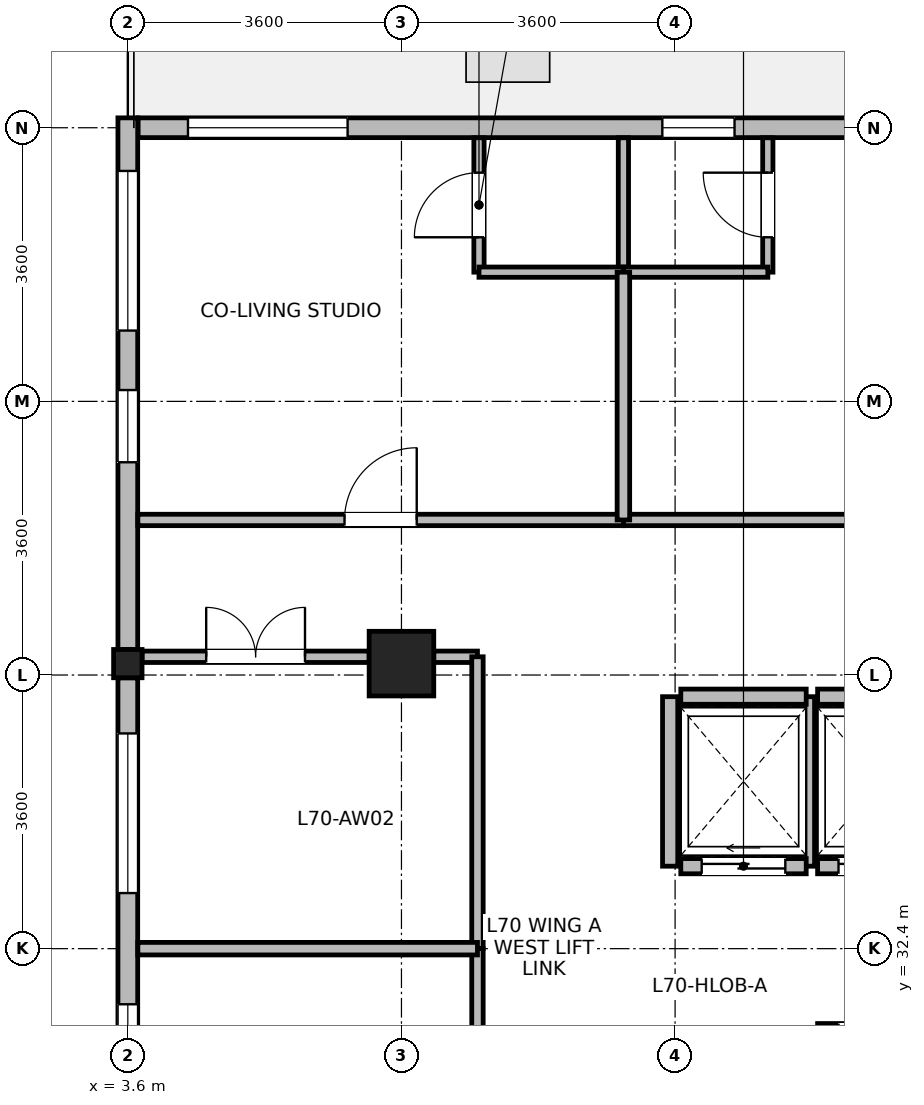
"""IFC4 building model, lengths in metres.
Left out: names, types, materials, properties, quantities, classifications, styles, units other than length and angle.
Written with IfcOpenShell. Run it as: python <this file> out.ifc"""

import sys

from ifc_helpers import new_model, si_unit, direction, frame, frame_2d, origin, origin_2d, place, context, subcontext, project, spatial, rectangle, i_section, extrude, source, transform, mapped, element, fill, save


model = new_model("IFC4")
c1 = context("Model", 3, precision=1e-05, world=origin(), true_north=direction((0.0, 1.0)))
c2 = subcontext(c1, "Body", "Model", "MODEL_VIEW")
j1 = project(units=[si_unit("LENGTHUNIT", "METRE"), si_unit("PLANEANGLEUNIT", "RADIAN")], contexts=[c1])
p1 = place(None, origin())
s1 = spatial("IfcSite", under=j1, at=p1, CompositionType="ELEMENT")
p2 = place(p1, origin())
s2 = spatial("IfcBuilding", under=s1, at=p2, CompositionType="ELEMENT")
p3 = place(p2, frame((0.0, 0.0, 272.1)))
s3 = spatial("IfcBuildingStorey", under=s2, at=p3, CompositionType="ELEMENT", Elevation=272.1)
m1 = source(origin(), c2, "Body", "SweptSolid", [
    extrude(rectangle(XDim=0.85, YDim=0.85, at=origin_2d()), origin(), (0.0, 0.0, 1.0), 3.7),
])
p4 = place(p3, frame((7.2, 36.15, 0.0), z_axis=(0.0, 0.0, 1.0), x_axis=(1.0, 0.0, 0.0)))
e1 = element("IfcColumn", 1, at=p4, inside=s3, PredefinedType="COLUMN", context=c2, shape_type="MappedRepresentation", body=[
    mapped(m1, transform((0.0, 0.0, 0.0), x_axis=(1.0, 0.0, 0.0), y_axis=(0.0, 1.0, 0.0), z_axis=(0.0, 0.0, 1.0), scale=1.0)),
])
m2 = source(origin(), c2, "Body", "SweptSolid", [
    extrude(i_section(OverallWidth=0.374, OverallDepth=0.372, WebThickness=0.015, FlangeThickness=0.026, FilletRadius=0.015, at=origin_2d()), origin(), (0.0, 0.0, 1.0), 3.7),
])
p5 = place(p3, frame((3.6, 36.15, 0.0), z_axis=(0.0, 0.0, 1.0), x_axis=(1.0, 0.0, 0.0)))
e2 = element("IfcColumn", 2, at=p5, inside=s3, PredefinedType="COLUMN", context=c2, shape_type="MappedRepresentation", body=[
    mapped(m2, transform((0.0, 0.0, 0.0), x_axis=(1.0, 0.0, 0.0), y_axis=(0.0, 1.0, 0.0), z_axis=(0.0, 0.0, 1.0), scale=1.0)),
])
p6 = place(p3, frame((3.735, 43.2, 0.0), z_axis=(0.0, 0.0, 1.0), x_axis=(1.0, 0.0, 0.0)))
e3 = element("IfcWall", 3, at=p6, inside=s3, PredefinedType="STANDARD", context=c2, shape_type="SweptSolid", body=[
    extrude(rectangle(XDim=10.239, YDim=0.26, at=frame_2d((5.12, 0.0))), origin(), (0.0, 0.0, 1.0), 3.455),
])
p7 = place(p6, frame((0.656, 0.0, 0.85)))
e4 = element("IfcOpeningElement", 4, at=p7, cuts=e3, PredefinedType="OPENING", context=c2, shape_type="SweptSolid", body=[
    extrude(rectangle(XDim=2.1, YDim=1.95, at=frame_2d((1.05, 0.975))), frame((0.0, 0.14, 0.0), z_axis=(0.0, -1.0, 0.0), x_axis=(1.0, 0.0, 0.0)), (0.0, 0.0, 1.0), 0.28),
])
p8 = place(p6, frame((6.897, 0.0, 0.85)))
e5 = element("IfcOpeningElement", 5, at=p8, cuts=e3, PredefinedType="OPENING", context=c2, shape_type="SweptSolid", body=[
    extrude(rectangle(XDim=0.95, YDim=1.75, at=frame_2d((0.475, 0.875))), frame((0.0, 0.14, 0.0), z_axis=(0.0, -1.0, 0.0), x_axis=(1.0, 0.0, 0.0)), (0.0, 0.0, 1.0), 0.28),
])
p9 = place(p3, frame((3.6, 36.337, 0.0), z_axis=(0.0, 0.0, 1.0), x_axis=(0.0, 1.0, 0.0)))
e6 = element("IfcWall", 6, at=p9, inside=s3, PredefinedType="STANDARD", context=c2, shape_type="SweptSolid", body=[
    extrude(rectangle(XDim=6.993, YDim=0.26, at=frame_2d((3.497, 0.0))), origin(), (0.0, 0.0, 1.0), 3.455),
])
p10 = place(p9, frame((4.195, 0.0, 0.85)))
e7 = element("IfcOpeningElement", 7, at=p10, cuts=e6, PredefinedType="OPENING", context=c2, shape_type="SweptSolid", body=[
    extrude(rectangle(XDim=2.1, YDim=1.95, at=frame_2d((1.05, 0.975))), frame((0.0, 0.14, 0.0), z_axis=(0.0, -1.0, 0.0), x_axis=(1.0, 0.0, 0.0)), (0.0, 0.0, 1.0), 0.28),
])
p11 = place(p9, frame((2.462, 0.0, 0.85)))
e8 = element("IfcOpeningElement", 8, at=p11, cuts=e6, PredefinedType="OPENING", context=c2, shape_type="SweptSolid", body=[
    extrude(rectangle(XDim=0.95, YDim=1.75, at=frame_2d((0.475, 0.875))), frame((0.0, 0.14, 0.0), z_axis=(0.0, -1.0, 0.0), x_axis=(1.0, 0.0, 0.0)), (0.0, 0.0, 1.0), 0.28),
])
p12 = place(p3, frame((3.6, 28.837, 0.0), z_axis=(0.0, 0.0, 1.0), x_axis=(0.0, 1.0, 0.0)))
e9 = element("IfcWall", 9, at=p12, inside=s3, PredefinedType="STANDARD", context=c2, shape_type="SweptSolid", body=[
    extrude(rectangle(XDim=7.126, YDim=0.26, at=frame_2d((3.563, 0.0))), origin(), (0.0, 0.0, 1.0), 3.055),
])
p13 = place(p12, frame((0.731, 0.0, 0.85)))
e10 = element("IfcOpeningElement", 10, at=p13, cuts=e9, PredefinedType="OPENING", context=c2, shape_type="SweptSolid", body=[
    extrude(rectangle(XDim=2.1, YDim=1.95, at=frame_2d((1.05, 0.975))), frame((0.0, 0.14, 0.0), z_axis=(0.0, -1.0, 0.0), x_axis=(1.0, 0.0, 0.0)), (0.0, 0.0, 1.0), 0.28),
])
p14 = place(p12, frame((4.294, 0.0, 0.85)))
e11 = element("IfcOpeningElement", 11, at=p14, cuts=e9, PredefinedType="OPENING", context=c2, shape_type="SweptSolid", body=[
    extrude(rectangle(XDim=2.1, YDim=1.95, at=frame_2d((1.05, 0.975))), frame((0.0, 0.14, 0.0), z_axis=(0.0, -1.0, 0.0), x_axis=(1.0, 0.0, 0.0)), (0.0, 0.0, 1.0), 0.28),
])
p15 = place(p3, frame((12.675, 33.485, 0.0), z_axis=(0.0, 0.0, 1.0), x_axis=(1.0, 0.0, 0.0)))
e12 = element("IfcWall", 12, at=p15, inside=s3, PredefinedType="PARTITIONING", context=c2, shape_type="SweptSolid", body=[
    extrude(rectangle(XDim=1.65, YDim=0.2, at=frame_2d((0.825, 0.0))), origin(), (0.0, 0.0, 1.0), 3.455),
])
p16 = place(p15, frame((0.275, 0.0, 0.0)))
e13 = element("IfcOpeningElement", 13, at=p16, cuts=e12, PredefinedType="OPENING", context=c2, shape_type="SweptSolid", body=[
    extrude(rectangle(XDim=1.1, YDim=2.12, at=frame_2d((0.55, 1.06))), frame((0.0, 0.11, 0.0), z_axis=(0.0, -1.0, 0.0), x_axis=(1.0, 0.0, 0.0)), (0.0, 0.0, 1.0), 0.22),
])
p17 = place(p3, frame((12.675, 35.715, 0.0), z_axis=(0.0, 0.0, 1.0), x_axis=(1.0, 0.0, 0.0)))
e14 = element("IfcWall", 14, at=p17, inside=s3, PredefinedType="PARTITIONING", context=c2, shape_type="SweptSolid", body=[
    extrude(rectangle(XDim=1.65, YDim=0.2, at=frame_2d((0.825, 0.0))), origin(), (0.0, 0.0, 1.0), 3.455),
])
p18 = place(p3, frame((12.535, 33.485, 0.0), z_axis=(0.0, 0.0, 1.0), x_axis=(0.0, 1.0, 0.0)))
e15 = element("IfcWall", 15, at=p18, inside=s3, PredefinedType="PARTITIONING", context=c2, shape_type="SweptSolid", body=[
    extrude(rectangle(XDim=2.23, YDim=0.2, at=frame_2d((1.115, 0.0))), origin(), (0.0, 0.0, 1.0), 3.455),
])
p19 = place(p3, frame((12.675, 31.315, 0.0), z_axis=(0.0, 0.0, 1.0), x_axis=(1.0, 0.0, 0.0)))
e16 = element("IfcWall", 16, at=p19, inside=s3, PredefinedType="PARTITIONING", context=c2, shape_type="SweptSolid", body=[
    extrude(rectangle(XDim=1.65, YDim=0.2, at=frame_2d((0.825, 0.0))), origin(), (0.0, 0.0, 1.0), 3.455),
])
p20 = place(p19, frame((0.275, 0.0, 0.0)))
e17 = element("IfcOpeningElement", 17, at=p20, cuts=e16, PredefinedType="OPENING", context=c2, shape_type="SweptSolid", body=[
    extrude(rectangle(XDim=1.1, YDim=2.12, at=frame_2d((0.55, 1.06))), frame((0.0, 0.11, 0.0), z_axis=(0.0, -1.0, 0.0), x_axis=(1.0, 0.0, 0.0)), (0.0, 0.0, 1.0), 0.22),
])
p21 = place(p3, frame((10.875, 33.485, 0.0), z_axis=(0.0, 0.0, 1.0), x_axis=(1.0, 0.0, 0.0)))
e18 = element("IfcWall", 18, at=p21, inside=s3, PredefinedType="PARTITIONING", context=c2, shape_type="SweptSolid", body=[
    extrude(rectangle(XDim=1.65, YDim=0.2, at=frame_2d((0.825, 0.0))), origin(), (0.0, 0.0, 1.0), 3.455),
])
p22 = place(p21, frame((0.275, 0.0, 0.0)))
e19 = element("IfcOpeningElement", 19, at=p22, cuts=e18, PredefinedType="OPENING", context=c2, shape_type="SweptSolid", body=[
    extrude(rectangle(XDim=1.1, YDim=2.12, at=frame_2d((0.55, 1.06))), frame((0.0, 0.11, 0.0), z_axis=(0.0, -1.0, 0.0), x_axis=(1.0, 0.0, 0.0)), (0.0, 0.0, 1.0), 0.22),
])
p23 = place(p3, frame((10.875, 35.715, 0.0), z_axis=(0.0, 0.0, 1.0), x_axis=(1.0, 0.0, 0.0)))
e20 = element("IfcWall", 20, at=p23, inside=s3, PredefinedType="PARTITIONING", context=c2, shape_type="SweptSolid", body=[
    extrude(rectangle(XDim=1.65, YDim=0.2, at=frame_2d((0.825, 0.0))), origin(), (0.0, 0.0, 1.0), 3.455),
])
p24 = place(p3, frame((10.735, 33.485, 0.0), z_axis=(0.0, 0.0, 1.0), x_axis=(0.0, 1.0, 0.0)))
e21 = element("IfcWall", 21, at=p24, inside=s3, PredefinedType="PARTITIONING", context=c2, shape_type="SweptSolid", body=[
    extrude(rectangle(XDim=2.23, YDim=0.2, at=frame_2d((1.115, 0.0))), origin(), (0.0, 0.0, 1.0), 3.455),
])
p25 = place(p3, frame((8.22, 41.3, 0.0), z_axis=(0.0, 0.0, 1.0), x_axis=(0.0, 1.0, 0.0)))
e22 = element("IfcWall", 22, at=p25, inside=s3, PredefinedType="PARTITIONING", context=c2, shape_type="SweptSolid", body=[
    extrude(rectangle(XDim=1.768, YDim=0.135, at=frame_2d((0.884, 0.0))), origin(), (0.0, 0.0, 1.0), 3.455),
])
p26 = place(p25, frame((0.459, 0.0, 0.0)))
e23 = element("IfcOpeningElement", 23, at=p26, cuts=e22, PredefinedType="OPENING", context=c2, shape_type="SweptSolid", body=[
    extrude(rectangle(XDim=0.85, YDim=2.04, at=frame_2d((0.425, 1.02))), frame((0.0, 0.078, 0.0), z_axis=(0.0, -1.0, 0.0), x_axis=(1.0, 0.0, 0.0)), (0.0, 0.0, 1.0), 0.155),
])
p27 = place(p3, frame((10.12, 41.3, 0.0), z_axis=(0.0, 0.0, 1.0), x_axis=(0.0, 1.0, 0.0)))
e24 = element("IfcWall", 24, at=p27, inside=s3, PredefinedType="PARTITIONING", context=c2, shape_type="SweptSolid", body=[
    extrude(rectangle(XDim=1.768, YDim=0.135, at=frame_2d((0.884, 0.0))), origin(), (0.0, 0.0, 1.0), 3.455),
])
p28 = place(p3, frame((12.02, 41.3, 0.0), z_axis=(0.0, 0.0, 1.0), x_axis=(0.0, 1.0, 0.0)))
e25 = element("IfcWall", 25, at=p28, inside=s3, PredefinedType="PARTITIONING", context=c2, shape_type="SweptSolid", body=[
    extrude(rectangle(XDim=1.768, YDim=0.135, at=frame_2d((0.884, 0.0))), origin(), (0.0, 0.0, 1.0), 3.455),
])
p29 = place(p28, frame((0.459, 0.0, 0.0)))
e26 = element("IfcOpeningElement", 26, at=p29, cuts=e25, PredefinedType="OPENING", context=c2, shape_type="SweptSolid", body=[
    extrude(rectangle(XDim=0.85, YDim=2.04, at=frame_2d((0.425, 1.02))), frame((0.0, 0.078, 0.0), z_axis=(0.0, -1.0, 0.0), x_axis=(1.0, 0.0, 0.0)), (0.0, 0.0, 1.0), 0.155),
])
p30 = place(p3, frame((10.12, 41.3, 0.0), z_axis=(0.0, 0.0, 1.0), x_axis=(1.0, 0.0, 0.0)))
e27 = element("IfcWall", 27, at=p30, inside=s3, PredefinedType="PARTITIONING", context=c2, shape_type="SweptSolid", body=[
    extrude(rectangle(XDim=1.9, YDim=0.135, at=frame_2d((0.95, 0.0))), origin(), (0.0, 0.0, 1.0), 3.455),
])
p31 = place(p3, frame((8.22, 41.3, 0.0), z_axis=(0.0, 0.0, 1.0), x_axis=(1.0, 0.0, 0.0)))
e28 = element("IfcWall", 28, at=p31, inside=s3, PredefinedType="PARTITIONING", context=c2, shape_type="SweptSolid", body=[
    extrude(rectangle(XDim=1.9, YDim=0.135, at=frame_2d((0.95, 0.0))), origin(), (0.0, 0.0, 1.0), 3.455),
])
p32 = place(p3, frame((10.12, 38.04, 0.0), z_axis=(0.0, 0.0, 1.0), x_axis=(1.0, 0.0, 0.0)))
e29 = element("IfcWall", 29, at=p32, inside=s3, PredefinedType="PARTITIONING", context=c2, shape_type="SweptSolid", body=[
    extrude(rectangle(XDim=7.7, YDim=0.15, at=frame_2d((3.85, 0.0))), origin(), (0.0, 0.0, 1.0), 3.455),
])
p33 = place(p32, frame((3.325, 0.0, 0.0)))
e30 = element("IfcOpeningElement", 30, at=p33, cuts=e29, PredefinedType="OPENING", context=c2, shape_type="SweptSolid", body=[
    extrude(rectangle(XDim=1.05, YDim=2.12, at=frame_2d((0.525, 1.06))), frame((0.0, 0.085, 0.0), z_axis=(0.0, -1.0, 0.0), x_axis=(1.0, 0.0, 0.0)), (0.0, 0.0, 1.0), 0.17),
])
p34 = place(p3, frame((3.732, 38.04, 0.0), z_axis=(0.0, 0.0, 1.0), x_axis=(1.0, 0.0, 0.0)))
e31 = element("IfcWall", 31, at=p34, inside=s3, PredefinedType="PARTITIONING", context=c2, shape_type="SweptSolid", body=[
    extrude(rectangle(XDim=6.388, YDim=0.15, at=frame_2d((3.194, 0.0))), origin(), (0.0, 0.0, 1.0), 3.455),
])
p35 = place(p34, frame((2.719, 0.0, 0.0)))
e32 = element("IfcOpeningElement", 32, at=p35, cuts=e31, PredefinedType="OPENING", context=c2, shape_type="SweptSolid", body=[
    extrude(rectangle(XDim=0.95, YDim=2.1, at=frame_2d((0.475, 1.05))), frame((0.0, 0.085, 0.0), z_axis=(0.0, -1.0, 0.0), x_axis=(1.0, 0.0, 0.0)), (0.0, 0.0, 1.0), 0.17),
])
p36 = place(p3, frame((3.787, 36.24, 0.0), z_axis=(0.0, 0.0, 1.0), x_axis=(1.0, 0.0, 0.0)))
e33 = element("IfcWall", 33, at=p36, inside=s3, PredefinedType="PARTITIONING", context=c2, shape_type="SweptSolid", body=[
    extrude(rectangle(XDim=2.988, YDim=0.15, at=frame_2d((1.494, 0.0))), origin(), (0.0, 0.0, 1.0), 2.905),
])
p37 = place(p36, frame((0.844, 0.0, 0.0)))
e34 = element("IfcOpeningElement", 34, at=p37, cuts=e33, PredefinedType="OPENING", context=c2, shape_type="SweptSolid", body=[
    extrude(rectangle(XDim=1.3, YDim=2.12, at=frame_2d((0.65, 1.06))), frame((0.0, 0.085, 0.0), z_axis=(0.0, -1.0, 0.0), x_axis=(1.0, 0.0, 0.0)), (0.0, 0.0, 1.0), 0.17),
])
p38 = place(p3, frame((7.625, 36.24, 0.0), z_axis=(0.0, 0.0, 1.0), x_axis=(1.0, 0.0, 0.0)))
e35 = element("IfcWall", 35, at=p38, inside=s3, PredefinedType="PARTITIONING", context=c2, shape_type="SweptSolid", body=[
    extrude(rectangle(XDim=0.575, YDim=0.15, at=frame_2d((0.288, 0.0))), origin(), (0.0, 0.0, 1.0), 2.905),
])
p39 = place(p3, frame((8.2, 32.4, 0.0), z_axis=(0.0, 0.0, 1.0), x_axis=(0.0, 1.0, 0.0)))
e36 = element("IfcWall", 36, at=p39, inside=s3, PredefinedType="PARTITIONING", context=c2, shape_type="SweptSolid", body=[
    extrude(rectangle(XDim=3.84, YDim=0.15, at=frame_2d((1.92, 0.0))), origin(), (0.0, 0.0, 1.0), 3.455),
])
p40 = place(p3, frame((8.2, 28.56, 0.0), z_axis=(0.0, 0.0, 1.0), x_axis=(0.0, 1.0, 0.0)))
e37 = element("IfcWall", 37, at=p40, inside=s3, PredefinedType="PARTITIONING", context=c2, shape_type="SweptSolid", body=[
    extrude(rectangle(XDim=3.84, YDim=0.15, at=frame_2d((1.92, 0.0))), origin(), (0.0, 0.0, 1.0), 3.455),
])
p41 = place(p3, frame((3.732, 32.4, 0.0), z_axis=(0.0, 0.0, 1.0), x_axis=(1.0, 0.0, 0.0)))
e38 = element("IfcWall", 38, at=p41, inside=s3, PredefinedType="PARTITIONING", context=c2, shape_type="SweptSolid", body=[
    extrude(rectangle(XDim=4.468, YDim=0.165, at=frame_2d((2.234, 0.0))), origin(), (0.0, 0.0, 1.0), 3.455),
])
p42 = place(p3, frame((10.12, 38.04, 0.0), z_axis=(0.0, 0.0, 1.0), x_axis=(0.0, 1.0, 0.0)))
e39 = element("IfcWall", 39, at=p42, inside=s3, PredefinedType="PARTITIONING", context=c2, shape_type="SweptSolid", body=[
    extrude(rectangle(XDim=3.26, YDim=0.165, at=frame_2d((1.63, 0.0))), origin(), (0.0, 0.0, 1.0), 3.455),
])
p43 = place(p7, origin())
e40 = element("IfcWindow", 40, at=p43, inside=s3, PartitioningType="SINGLE_PANEL", PredefinedType="WINDOW", context=c2, shape_type="SweptSolid", body=[
    extrude(rectangle(XDim=2.1, YDim=1.95, at=frame_2d((1.05, 0.975))), frame((0.0, 0.03, 0.0), z_axis=(0.0, -1.0, 0.0), x_axis=(1.0, 0.0, 0.0)), (0.0, 0.0, 1.0), 0.06),
])
fill(e4, e40)
p44 = place(p8, origin())
e41 = element("IfcWindow", 41, at=p44, inside=s3, PartitioningType="SINGLE_PANEL", PredefinedType="WINDOW", context=c2, shape_type="SweptSolid", body=[
    extrude(rectangle(XDim=0.95, YDim=1.75, at=frame_2d((0.475, 0.875))), frame((0.0, 0.03, 0.0), z_axis=(0.0, -1.0, 0.0), x_axis=(1.0, 0.0, 0.0)), (0.0, 0.0, 1.0), 0.06),
])
fill(e5, e41)
p45 = place(p10, origin())
e42 = element("IfcWindow", 42, at=p45, inside=s3, PartitioningType="SINGLE_PANEL", PredefinedType="WINDOW", context=c2, shape_type="SweptSolid", body=[
    extrude(rectangle(XDim=2.1, YDim=1.95, at=frame_2d((1.05, 0.975))), frame((0.0, 0.03, 0.0), z_axis=(0.0, -1.0, 0.0), x_axis=(1.0, 0.0, 0.0)), (0.0, 0.0, 1.0), 0.06),
])
fill(e7, e42)
p46 = place(p11, origin())
e43 = element("IfcWindow", 43, at=p46, inside=s3, PartitioningType="SINGLE_PANEL", PredefinedType="WINDOW", context=c2, shape_type="SweptSolid", body=[
    extrude(rectangle(XDim=0.95, YDim=1.75, at=frame_2d((0.475, 0.875))), frame((0.0, 0.03, 0.0), z_axis=(0.0, -1.0, 0.0), x_axis=(1.0, 0.0, 0.0)), (0.0, 0.0, 1.0), 0.06),
])
fill(e8, e43)
p47 = place(p13, origin())
e44 = element("IfcWindow", 44, at=p47, inside=s3, PartitioningType="SINGLE_PANEL", PredefinedType="WINDOW", context=c2, shape_type="SweptSolid", body=[
    extrude(rectangle(XDim=2.1, YDim=1.95, at=frame_2d((1.05, 0.975))), frame((0.0, 0.03, 0.0), z_axis=(0.0, -1.0, 0.0), x_axis=(1.0, 0.0, 0.0)), (0.0, 0.0, 1.0), 0.06),
])
fill(e10, e44)
p48 = place(p14, origin())
e45 = element("IfcWindow", 45, at=p48, inside=s3, PartitioningType="SINGLE_PANEL", PredefinedType="WINDOW", context=c2, shape_type="SweptSolid", body=[
    extrude(rectangle(XDim=2.1, YDim=1.95, at=frame_2d((1.05, 0.975))), frame((0.0, 0.03, 0.0), z_axis=(0.0, -1.0, 0.0), x_axis=(1.0, 0.0, 0.0)), (0.0, 0.0, 1.0), 0.06),
])
fill(e11, e45)
p49 = place(p16, origin())
e46 = element("IfcDoor", 46, at=p49, inside=s3, OperationType="SLIDING_TO_LEFT", PredefinedType="DOOR", context=c2, shape_type="SweptSolid", body=[
    extrude(rectangle(XDim=1.1, YDim=2.12, at=frame_2d((0.55, 1.06))), frame((0.0, 0.025, 0.0), z_axis=(0.0, -1.0, 0.0), x_axis=(1.0, 0.0, 0.0)), (0.0, 0.0, 1.0), 0.05),
])
fill(e13, e46)
p50 = place(p22, origin())
e47 = element("IfcDoor", 47, at=p50, inside=s3, OperationType="SLIDING_TO_LEFT", PredefinedType="DOOR", context=c2, shape_type="SweptSolid", body=[
    extrude(rectangle(XDim=1.1, YDim=2.12, at=frame_2d((0.55, 1.06))), frame((0.0, 0.025, 0.0), z_axis=(0.0, -1.0, 0.0), x_axis=(1.0, 0.0, 0.0)), (0.0, 0.0, 1.0), 0.05),
])
fill(e19, e47)
p51 = place(p26, origin())
e48 = element("IfcDoor", 48, at=p51, inside=s3, OperationType="SINGLE_SWING_LEFT", PredefinedType="DOOR", context=c2, shape_type="SweptSolid", body=[
    extrude(rectangle(XDim=0.85, YDim=2.04, at=frame_2d((0.425, 1.02))), frame((0.0, 0.025, 0.0), z_axis=(0.0, -1.0, 0.0), x_axis=(1.0, 0.0, 0.0)), (0.0, 0.0, 1.0), 0.05),
])
fill(e23, e48)
p52 = place(p29, origin())
e49 = element("IfcDoor", 49, at=p52, inside=s3, OperationType="SINGLE_SWING_RIGHT", PredefinedType="DOOR", context=c2, shape_type="SweptSolid", body=[
    extrude(rectangle(XDim=0.85, YDim=2.04, at=frame_2d((0.425, 1.02))), frame((0.0, 0.025, 0.0), z_axis=(0.0, -1.0, 0.0), x_axis=(1.0, 0.0, 0.0)), (0.0, 0.0, 1.0), 0.05),
])
fill(e26, e49)
p53 = place(p35, origin())
e50 = element("IfcDoor", 50, at=p53, inside=s3, OperationType="SINGLE_SWING_RIGHT", PredefinedType="DOOR", context=c2, shape_type="SweptSolid", body=[
    extrude(rectangle(XDim=0.95, YDim=2.1, at=frame_2d((0.475, 1.05))), frame((0.0, 0.025, 0.0), z_axis=(0.0, -1.0, 0.0), x_axis=(1.0, 0.0, 0.0)), (0.0, 0.0, 1.0), 0.05),
])
fill(e32, e50)
p54 = place(p37, origin())
e51 = element("IfcDoor", 51, at=p54, inside=s3, OperationType="DOUBLE_DOOR_SINGLE_SWING", PredefinedType="DOOR", context=c2, shape_type="SweptSolid", body=[
    extrude(rectangle(XDim=1.3, YDim=2.12, at=frame_2d((0.65, 1.06))), frame((0.0, 0.025, 0.0), z_axis=(0.0, -1.0, 0.0), x_axis=(1.0, 0.0, 0.0)), (0.0, 0.0, 1.0), 0.05),
])
fill(e34, e51)
save(model, sys.argv[1])
